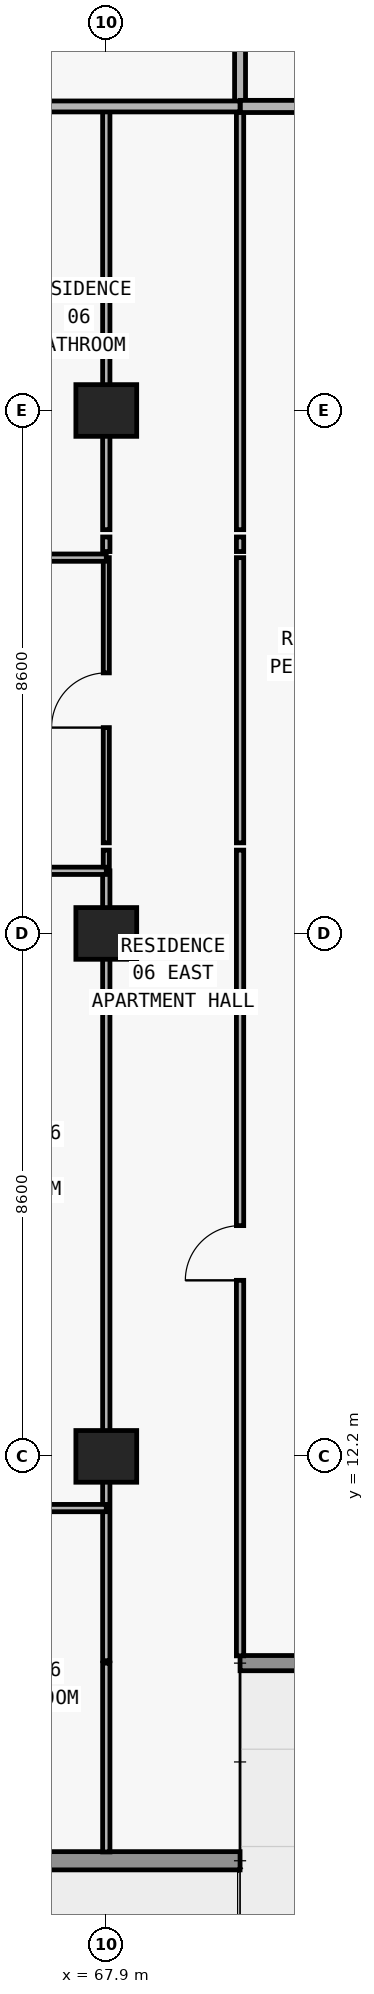
"""IFC4 building model, lengths in metres.
Left out: names, types, materials, properties, quantities, classifications, styles, units other than length and angle.
Written with IfcOpenShell. Run it as: python <this file> out.ifc"""

import sys

from ifc_helpers import new_model, si_unit, direction, frame, frame_2d, origin, origin_2d, place, context, subcontext, project, spatial, rectangle, extrude, element, fill, save


model = new_model("IFC4")
c1 = context("Model", 3, precision=1e-05, world=origin(), true_north=direction((0.0, 1.0)))
c2 = subcontext(c1, "Body", "Model", "MODEL_VIEW")
j1 = project(units=[si_unit("LENGTHUNIT", "METRE"), si_unit("PLANEANGLEUNIT", "RADIAN")], contexts=[c1])
p1 = place(None, origin())
s1 = spatial("IfcSite", under=j1, at=p1, CompositionType="ELEMENT")
p2 = place(p1, origin())
s2 = spatial("IfcBuilding", under=s1, at=p2, CompositionType="ELEMENT")
p3 = place(p2, frame((0.0, 0.0, 84.6)))
s3 = spatial("IfcBuildingStorey", under=s2, at=p3, CompositionType="ELEMENT", Elevation=84.6)
for number, where, z_axis, x_axis in (
    (1, (67.9, 12.2, 0.0), (0.0, 0.0, 1.0), (1.0, 0.0, 0.0)),
    (2, (67.9, 20.8, 0.0), (0.0, 0.0, 1.0), (1.0, 0.0, 0.0)),
    (3, (67.9, 29.4, 0.0), (0.0, 0.0, 1.0), (1.0, 0.0, 0.0)),
):
    element("IfcColumn", number, at=place(p3, frame(where, z_axis=z_axis, x_axis=x_axis)), inside=s3, PredefinedType="COLUMN", context=c2, shape_type="SweptSolid", body=[
        extrude(rectangle(XDim=1.0, YDim=0.85, at=origin_2d()), origin(), (0.0, 0.0, 1.0), 3.05),
    ])
p4 = place(p3, frame((70.1, 5.55, 0.0), z_axis=(0.0, 0.0, 1.0), x_axis=(-1.0, 0.0, 0.0)))
e4 = element("IfcWall", 4, at=p4, inside=s3, PredefinedType="STANDARD", context=c2, shape_type="SweptSolid", body=[
    extrude(rectangle(XDim=62.4, YDim=0.3, at=frame_2d((31.2, 0.0))), origin(), (0.0, 0.0, 1.0), 3.05),
])
p5 = place(p4, frame((57.226, 0.0, 0.0)))
e5 = element("IfcOpeningElement", 5, at=p5, cuts=e4, PredefinedType="OPENING", context=c2, shape_type="SweptSolid", body=[
    extrude(rectangle(XDim=2.0, YDim=2.3, at=frame_2d((1.0, 1.15))), frame((0.0, 0.16, 0.0), z_axis=(0.0, -1.0, 0.0), x_axis=(1.0, 0.0, 0.0)), (0.0, 0.0, 1.0), 0.32),
])
p6 = place(p4, frame((52.926, 0.0, 0.85)))
e6 = element("IfcOpeningElement", 6, at=p6, cuts=e4, PredefinedType="OPENING", context=c2, shape_type="SweptSolid", body=[
    extrude(rectangle(XDim=2.2, YDim=1.55, at=frame_2d((1.1, 0.775))), frame((0.0, 0.16, 0.0), z_axis=(0.0, -1.0, 0.0), x_axis=(1.0, 0.0, 0.0)), (0.0, 0.0, 1.0), 0.32),
])
p7 = place(p4, frame((48.49, 0.0, 0.0)))
e7 = element("IfcOpeningElement", 7, at=p7, cuts=e4, PredefinedType="OPENING", context=c2, shape_type="SweptSolid", body=[
    extrude(rectangle(XDim=2.0, YDim=2.3, at=frame_2d((1.0, 1.15))), frame((0.0, 0.16, 0.0), z_axis=(0.0, -1.0, 0.0), x_axis=(1.0, 0.0, 0.0)), (0.0, 0.0, 1.0), 0.32),
])
p8 = place(p4, frame((44.39, 0.0, 0.85)))
e8 = element("IfcOpeningElement", 8, at=p8, cuts=e4, PredefinedType="OPENING", context=c2, shape_type="SweptSolid", body=[
    extrude(rectangle(XDim=1.8, YDim=1.55, at=frame_2d((0.9, 0.775))), frame((0.0, 0.16, 0.0), z_axis=(0.0, -1.0, 0.0), x_axis=(1.0, 0.0, 0.0)), (0.0, 0.0, 1.0), 0.32),
])
p9 = place(p4, frame((40.426, 0.0, 0.0)))
e9 = element("IfcOpeningElement", 9, at=p9, cuts=e4, PredefinedType="OPENING", context=c2, shape_type="SweptSolid", body=[
    extrude(rectangle(XDim=2.0, YDim=2.3, at=frame_2d((1.0, 1.15))), frame((0.0, 0.16, 0.0), z_axis=(0.0, -1.0, 0.0), x_axis=(1.0, 0.0, 0.0)), (0.0, 0.0, 1.0), 0.32),
])
p10 = place(p4, frame((36.126, 0.0, 0.85)))
e10 = element("IfcOpeningElement", 10, at=p10, cuts=e4, PredefinedType="OPENING", context=c2, shape_type="SweptSolid", body=[
    extrude(rectangle(XDim=2.2, YDim=1.55, at=frame_2d((1.1, 0.775))), frame((0.0, 0.16, 0.0), z_axis=(0.0, -1.0, 0.0), x_axis=(1.0, 0.0, 0.0)), (0.0, 0.0, 1.0), 0.32),
])
p11 = place(p4, frame((32.09, 0.0, 0.0)))
e11 = element("IfcOpeningElement", 11, at=p11, cuts=e4, PredefinedType="OPENING", context=c2, shape_type="SweptSolid", body=[
    extrude(rectangle(XDim=2.0, YDim=2.3, at=frame_2d((1.0, 1.15))), frame((0.0, 0.16, 0.0), z_axis=(0.0, -1.0, 0.0), x_axis=(1.0, 0.0, 0.0)), (0.0, 0.0, 1.0), 0.32),
])
p12 = place(p4, frame((28.21, 0.0, 0.65)))
e12 = element("IfcOpeningElement", 12, at=p12, cuts=e4, PredefinedType="OPENING", context=c2, shape_type="SweptSolid", body=[
    extrude(rectangle(XDim=2.6, YDim=1.85, at=frame_2d((1.3, 0.925))), frame((0.0, 0.16, 0.0), z_axis=(0.0, -1.0, 0.0), x_axis=(1.0, 0.0, 0.0)), (0.0, 0.0, 1.0), 0.32),
])
p13 = place(p4, frame((22.1, 0.0, 0.85)))
e13 = element("IfcOpeningElement", 13, at=p13, cuts=e4, PredefinedType="OPENING", context=c2, shape_type="SweptSolid", body=[
    extrude(rectangle(XDim=2.2, YDim=1.55, at=frame_2d((1.1, 0.775))), frame((0.0, 0.16, 0.0), z_axis=(0.0, -1.0, 0.0), x_axis=(1.0, 0.0, 0.0)), (0.0, 0.0, 1.0), 0.32),
])
p14 = place(p4, frame((16.026, 0.0, 0.0)))
e14 = element("IfcOpeningElement", 14, at=p14, cuts=e4, PredefinedType="OPENING", context=c2, shape_type="SweptSolid", body=[
    extrude(rectangle(XDim=2.0, YDim=2.3, at=frame_2d((1.0, 1.15))), frame((0.0, 0.16, 0.0), z_axis=(0.0, -1.0, 0.0), x_axis=(1.0, 0.0, 0.0)), (0.0, 0.0, 1.0), 0.32),
])
p15 = place(p4, frame((11.726, 0.0, 0.85)))
e15 = element("IfcOpeningElement", 15, at=p15, cuts=e4, PredefinedType="OPENING", context=c2, shape_type="SweptSolid", body=[
    extrude(rectangle(XDim=2.2, YDim=1.55, at=frame_2d((1.1, 0.775))), frame((0.0, 0.16, 0.0), z_axis=(0.0, -1.0, 0.0), x_axis=(1.0, 0.0, 0.0)), (0.0, 0.0, 1.0), 0.32),
])
p16 = place(p4, frame((7.29, 0.0, 0.0)))
e16 = element("IfcOpeningElement", 16, at=p16, cuts=e4, PredefinedType="OPENING", context=c2, shape_type="SweptSolid", body=[
    extrude(rectangle(XDim=2.0, YDim=2.3, at=frame_2d((1.0, 1.15))), frame((0.0, 0.16, 0.0), z_axis=(0.0, -1.0, 0.0), x_axis=(1.0, 0.0, 0.0)), (0.0, 0.0, 1.0), 0.32),
])
p17 = place(p4, frame((3.19, 0.0, 0.85)))
e17 = element("IfcOpeningElement", 17, at=p17, cuts=e4, PredefinedType="OPENING", context=c2, shape_type="SweptSolid", body=[
    extrude(rectangle(XDim=1.8, YDim=1.55, at=frame_2d((0.9, 0.775))), frame((0.0, 0.16, 0.0), z_axis=(0.0, -1.0, 0.0), x_axis=(1.0, 0.0, 0.0)), (0.0, 0.0, 1.0), 0.32),
])
p18 = place(p3, frame((70.1, 8.8, 0.0), z_axis=(0.0, 0.0, 1.0), x_axis=(1.0, 0.0, 0.0)))
e18 = element("IfcWall", 18, at=p18, inside=s3, PredefinedType="ELEMENTEDWALL", context=c2, shape_type="SweptSolid", body=[
    extrude(rectangle(XDim=3.65, YDim=0.25, at=frame_2d((1.825, 0.0))), origin(), (0.0, 0.0, 1.0), 3.05),
])
p19 = place(p3, frame((67.9, 5.695, 0.0), z_axis=(0.0, 0.0, 1.0), x_axis=(0.0, 1.0, 0.0)))
e19 = element("IfcWall", 19, at=p19, inside=s3, PredefinedType="PARTITIONING", context=c2, shape_type="SweptSolid", body=[
    extrude(rectangle(XDim=3.105, YDim=0.12, at=frame_2d((1.552, 0.0))), origin(), (0.0, 0.0, 1.0), 3.05),
])
p20 = place(p3, frame((67.9, 8.84, 0.0), z_axis=(0.0, 0.0, 1.0), x_axis=(0.0, 1.0, 0.0)))
e20 = element("IfcWall", 20, at=p20, inside=s3, PredefinedType="PARTITIONING", context=c2, shape_type="SweptSolid", body=[
    extrude(rectangle(XDim=12.99, YDim=0.12, at=frame_2d((6.495, 0.0))), origin(), (0.0, 0.0, 1.0), 2.174),
])
p21 = place(p3, frame((67.9, 21.835, 0.0), z_axis=(0.0, 0.0, 1.0), x_axis=(0.0, 1.0, 0.0)))
e21 = element("IfcWall", 21, at=p21, inside=s3, PredefinedType="MOVABLE", context=c2, shape_type="SweptSolid", body=[
    extrude(rectangle(XDim=0.335, YDim=0.1, at=frame_2d((0.167, 0.0))), origin(), (0.0, 0.0, 1.0), 2.174),
])
p22 = place(p3, frame((67.9, 22.29, 0.0), z_axis=(0.0, 0.0, 1.0), x_axis=(0.0, 1.0, 0.0)))
e22 = element("IfcWall", 22, at=p22, inside=s3, PredefinedType="MOVABLE", context=c2, shape_type="SweptSolid", body=[
    extrude(rectangle(XDim=4.69, YDim=0.1, at=frame_2d((2.345, 0.0))), origin(), (0.0, 0.0, 1.0), 2.174),
])
p23 = place(p22, frame((1.895, 0.0, 0.0)))
e23 = element("IfcOpeningElement", 23, at=p23, cuts=e22, PredefinedType="OPENING", context=c2, shape_type="SweptSolid", body=[
    extrude(rectangle(XDim=0.9, YDim=2.124, at=frame_2d((0.45, 1.062))), frame((0.0, 0.06, 0.0), z_axis=(0.0, -1.0, 0.0), x_axis=(1.0, 0.0, 0.0)), (0.0, 0.0, 1.0), 0.12),
])
p24 = place(p3, frame((67.9, 27.08, 0.0), z_axis=(0.0, 0.0, 1.0), x_axis=(0.0, 1.0, 0.0)))
e24 = element("IfcWall", 24, at=p24, inside=s3, PredefinedType="PARTITIONING", context=c2, shape_type="SweptSolid", body=[
    extrude(rectangle(XDim=0.24, YDim=0.12, at=frame_2d((0.12, 0.0))), origin(), (0.0, 0.0, 1.0), 2.174),
])
p25 = place(p3, frame((67.9, 27.44, 0.0), z_axis=(0.0, 0.0, 1.0), x_axis=(0.0, 1.0, 0.0)))
e25 = element("IfcWall", 25, at=p25, inside=s3, PredefinedType="PARTITIONING", context=c2, shape_type="SweptSolid", body=[
    extrude(rectangle(XDim=6.96, YDim=0.12, at=frame_2d((3.48, 0.0))), origin(), (0.0, 0.0, 1.0), 2.174),
])
p26 = place(p3, frame((70.1, 8.92, 0.0), z_axis=(0.0, 0.0, 1.0), x_axis=(0.0, 1.0, 0.0)))
e26 = element("IfcWall", 26, at=p26, inside=s3, PredefinedType="PARTITIONING", context=c2, shape_type="SweptSolid", body=[
    extrude(rectangle(XDim=13.25, YDim=0.12, at=frame_2d((6.625, 0.0))), origin(), (0.0, 0.0, 1.0), 3.05),
])
p27 = place(p26, frame((6.175, 0.0, 0.0)))
e27 = element("IfcOpeningElement", 27, at=p27, cuts=e26, PredefinedType="OPENING", context=c2, shape_type="SweptSolid", body=[
    extrude(rectangle(XDim=0.9, YDim=2.15, at=frame_2d((0.45, 1.075))), frame((0.0, 0.07, 0.0), z_axis=(0.0, -1.0, 0.0), x_axis=(1.0, 0.0, 0.0)), (0.0, 0.0, 1.0), 0.14),
])
p28 = place(p3, frame((70.1, 22.29, 0.0), z_axis=(0.0, 0.0, 1.0), x_axis=(0.0, 1.0, 0.0)))
e28 = element("IfcWall", 28, at=p28, inside=s3, PredefinedType="PARTITIONING", context=c2, shape_type="SweptSolid", body=[
    extrude(rectangle(XDim=4.69, YDim=0.12, at=frame_2d((2.345, 0.0))), origin(), (0.0, 0.0, 1.0), 3.05),
])
p29 = place(p3, frame((70.1, 27.08, 0.0), z_axis=(0.0, 0.0, 1.0), x_axis=(0.0, 1.0, 0.0)))
e29 = element("IfcWall", 29, at=p29, inside=s3, PredefinedType="PARTITIONING", context=c2, shape_type="SweptSolid", body=[
    extrude(rectangle(XDim=0.24, YDim=0.12, at=frame_2d((0.12, 0.0))), origin(), (0.0, 0.0, 1.0), 3.05),
])
p30 = place(p3, frame((70.1, 27.44, 0.0), z_axis=(0.0, 0.0, 1.0), x_axis=(0.0, 1.0, 0.0)))
e30 = element("IfcWall", 30, at=p30, inside=s3, PredefinedType="PARTITIONING", context=c2, shape_type="SweptSolid", body=[
    extrude(rectangle(XDim=6.96, YDim=0.12, at=frame_2d((3.48, 0.0))), origin(), (0.0, 0.0, 1.0), 3.05),
])
p31 = place(p3, frame((70.1, 34.405, 0.0), z_axis=(0.0, 0.0, 1.0), x_axis=(0.0, 1.0, 0.0)))
e31 = element("IfcWall", 31, at=p31, inside=s3, PredefinedType="PARTITIONING", context=c2, shape_type="SweptSolid", body=[
    extrude(rectangle(XDim=2.545, YDim=0.18, at=frame_2d((1.272, 0.0))), origin(), (0.0, 0.0, 1.0), 3.05),
])
p32 = place(p3, frame((64.12, 11.35, 0.0), z_axis=(0.0, 0.0, 1.0), x_axis=(1.0, 0.0, 0.0)))
e32 = element("IfcWall", 32, at=p32, inside=s3, PredefinedType="PARTITIONING", context=c2, shape_type="SweptSolid", body=[
    extrude(rectangle(XDim=3.78, YDim=0.12, at=frame_2d((1.89, 0.0))), origin(), (0.0, 0.0, 1.0), 3.05),
])
p33 = place(p32, frame((1.44, 0.0, 0.0)))
e33 = element("IfcOpeningElement", 33, at=p33, cuts=e32, PredefinedType="OPENING", context=c2, shape_type="SweptSolid", body=[
    extrude(rectangle(XDim=0.9, YDim=2.15, at=frame_2d((0.45, 1.075))), frame((0.0, 0.07, 0.0), z_axis=(0.0, -1.0, 0.0), x_axis=(1.0, 0.0, 0.0)), (0.0, 0.0, 1.0), 0.14),
])
p34 = place(p3, frame((59.55, 21.83, 0.0), z_axis=(0.0, 0.0, 1.0), x_axis=(1.0, 0.0, 0.0)))
e34 = element("IfcWall", 34, at=p34, inside=s3, PredefinedType="PARTITIONING", context=c2, shape_type="SweptSolid", body=[
    extrude(rectangle(XDim=8.35, YDim=0.12, at=frame_2d((4.175, 0.0))), origin(), (0.0, 0.0, 1.0), 3.05),
])
p35 = place(p34, frame((1.668, 0.0, 0.0)))
e35 = element("IfcOpeningElement", 35, at=p35, cuts=e34, PredefinedType="OPENING", context=c2, shape_type="SweptSolid", body=[
    extrude(rectangle(XDim=0.9, YDim=2.15, at=frame_2d((0.45, 1.075))), frame((0.0, 0.07, 0.0), z_axis=(0.0, -1.0, 0.0), x_axis=(1.0, 0.0, 0.0)), (0.0, 0.0, 1.0), 0.14),
])
p36 = place(p34, frame((6.01, 0.0, 0.0)))
e36 = element("IfcOpeningElement", 36, at=p36, cuts=e34, PredefinedType="OPENING", context=c2, shape_type="SweptSolid", body=[
    extrude(rectangle(XDim=0.9, YDim=2.15, at=frame_2d((0.45, 1.075))), frame((0.0, 0.07, 0.0), z_axis=(0.0, -1.0, 0.0), x_axis=(1.0, 0.0, 0.0)), (0.0, 0.0, 1.0), 0.14),
])
p37 = place(p3, frame((59.55, 26.98, 0.0), z_axis=(0.0, 0.0, 1.0), x_axis=(1.0, 0.0, 0.0)))
e37 = element("IfcWall", 37, at=p37, inside=s3, PredefinedType="PARTITIONING", context=c2, shape_type="SweptSolid", body=[
    extrude(rectangle(XDim=8.35, YDim=0.12, at=frame_2d((4.175, 0.0))), origin(), (0.0, 0.0, 1.0), 3.05),
])
p38 = place(p37, frame((1.668, 0.0, 0.0)))
e38 = element("IfcOpeningElement", 38, at=p38, cuts=e37, PredefinedType="OPENING", context=c2, shape_type="SweptSolid", body=[
    extrude(rectangle(XDim=0.9, YDim=2.15, at=frame_2d((0.45, 1.075))), frame((0.0, 0.07, 0.0), z_axis=(0.0, -1.0, 0.0), x_axis=(1.0, 0.0, 0.0)), (0.0, 0.0, 1.0), 0.14),
])
p39 = place(p3, frame((59.55, 34.4, 0.0), z_axis=(0.0, 0.0, 1.0), x_axis=(1.0, 0.0, 0.0)))
e39 = element("IfcWall", 39, at=p39, inside=s3, PredefinedType="PARTITIONING", context=c2, shape_type="SweptSolid", body=[
    extrude(rectangle(XDim=10.55, YDim=0.18, at=frame_2d((5.275, 0.0))), origin(), (0.0, 0.0, 1.0), 3.05),
])
p40 = place(p39, frame((2.85, 0.0, 0.0)))
e40 = element("IfcOpeningElement", 40, at=p40, cuts=e39, PredefinedType="OPENING", context=c2, shape_type="SweptSolid", body=[
    extrude(rectangle(XDim=1.0, YDim=2.2, at=frame_2d((0.5, 1.1))), frame((0.0, 0.1, 0.0), z_axis=(0.0, -1.0, 0.0), x_axis=(1.0, 0.0, 0.0)), (0.0, 0.0, 1.0), 0.2),
])
p41 = place(p3, frame((70.105, 34.4, 0.0), z_axis=(0.0, 0.0, 1.0), x_axis=(1.0, 0.0, 0.0)))
e41 = element("IfcWall", 41, at=p41, inside=s3, PredefinedType="PARTITIONING", context=c2, shape_type="SweptSolid", body=[
    extrude(rectangle(XDim=3.5, YDim=0.2, at=frame_2d((1.75, 0.0))), origin(), (0.0, 0.0, 1.0), 3.05),
])
p42 = place(p23, origin())
e42 = element("IfcDoor", 42, at=p42, inside=s3, OperationType="SINGLE_SWING_LEFT", PredefinedType="DOOR", context=c2, shape_type="SweptSolid", body=[
    extrude(rectangle(XDim=0.9, YDim=2.124, at=frame_2d((0.45, 1.062))), frame((0.0, 0.025, 0.0), z_axis=(0.0, -1.0, 0.0), x_axis=(1.0, 0.0, 0.0)), (0.0, 0.0, 1.0), 0.05),
])
fill(e23, e42)
p43 = place(p27, origin())
e43 = element("IfcDoor", 43, at=p43, inside=s3, OperationType="SINGLE_SWING_LEFT", PredefinedType="DOOR", context=c2, shape_type="SweptSolid", body=[
    extrude(rectangle(XDim=0.9, YDim=2.15, at=frame_2d((0.45, 1.075))), frame((0.0, 0.025, 0.0), z_axis=(0.0, -1.0, 0.0), x_axis=(1.0, 0.0, 0.0)), (0.0, 0.0, 1.0), 0.05),
])
fill(e27, e43)
save(model, sys.argv[1])
